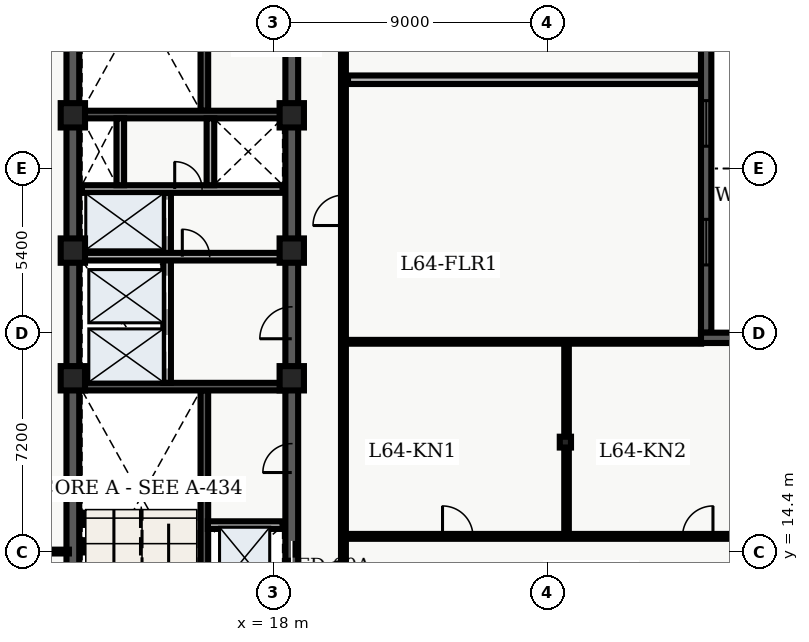
"""IFC4 building model, lengths in metres.
Left out: names, types, materials, properties, quantities, classifications, styles, units other than length and angle.
Written with IfcOpenShell. Run it as: python <this file> out.ifc"""

import sys

from ifc_helpers import new_model, entity, si_unit, converted_unit, direction, frame, origin_with_axes, origin_2d_with_axis, place, context, subcontext, project, spatial, polyline, rectangle, i_section, outline, extrude, element, fill, save


model = new_model("IFC4")
c1 = context("Model", 3, precision=1e-05, world=origin_with_axes(), true_north=direction((0.0, 1.0)))
c2 = subcontext(c1, "Body", "Model", "MODEL_VIEW")
j1 = project(units=[si_unit("LENGTHUNIT", "METRE"), converted_unit("PLANEANGLEUNIT", "DEGREE", entity("IfcPlaneAngleMeasure", 0.017), si_unit("PLANEANGLEUNIT", "RADIAN"), dimensions=[0, 0, 0, 0, 0, 0, 0])], contexts=[c1])
p1 = place(None, origin_with_axes())
s1 = spatial("IfcSite", under=j1, at=p1, CompositionType="ELEMENT")
p2 = place(p1, origin_with_axes())
s2 = spatial("IfcBuilding", under=s1, at=p2, CompositionType="ELEMENT")
p3 = place(p2, frame((0.0, 0.0, 260.7), z_axis=(0.0, 0.0, 1.0), x_axis=(1.0, 0.0, 0.0)))
s3 = spatial("IfcBuildingStorey", under=s2, at=p3, CompositionType="ELEMENT", Elevation=260.7)
p4 = place(p3, frame((11.4, 10.8, 0.0), z_axis=(0.0, 0.0, 1.0), x_axis=(0.0, 1.0, 0.0)))
e1 = element("IfcWall", 1, at=p4, inside=s3, PredefinedType="SHEAR", context=c2, shape_type="SweptSolid", body=[
    extrude(outline(polyline([(0.0, -0.21), (27.0, -0.21), (27.0, 0.21), (0.0, 0.21), (0.0, -0.21)])), origin_with_axes(), (0.0, 0.0, 1.0), 3.66),
])
p5 = place(p3, frame((18.6, 10.8, 0.0), z_axis=(0.0, 0.0, 1.0), x_axis=(0.0, 1.0, 0.0)))
e2 = element("IfcWall", 2, at=p5, inside=s3, PredefinedType="SHEAR", context=c2, shape_type="SweptSolid", body=[
    extrude(outline(polyline([(0.0, -0.21), (13.5, -0.21), (13.5, 0.21), (0.0, 0.21), (0.0, -0.21)])), origin_with_axes(), (0.0, 0.0, 1.0), 3.66),
])
p6 = place(p5, frame((1.3, 0.0, 0.0), z_axis=(0.0, 0.0, 1.0), x_axis=(1.0, 0.0, 0.0)))
e3 = element("IfcOpeningElement", 3, at=p6, cuts=e2, PredefinedType="OPENING", context=c2, shape_type="SweptSolid", body=[
    extrude(rectangle(XDim=1.1, YDim=0.44, at=origin_2d_with_axis()), origin_with_axes(), (0.0, 0.0, 1.0), 2.15),
])
p7 = place(p5, frame((3.4, 0.0, 0.0), z_axis=(0.0, 0.0, 1.0), x_axis=(1.0, 0.0, 0.0)))
e4 = element("IfcOpeningElement", 4, at=p7, cuts=e2, PredefinedType="OPENING", context=c2, shape_type="SweptSolid", body=[
    extrude(rectangle(XDim=1.1, YDim=0.44, at=origin_2d_with_axis()), origin_with_axes(), (0.0, 0.0, 1.0), 2.15),
])
p8 = place(p5, frame((11.125, 0.0, 0.0), z_axis=(0.0, 0.0, 1.0), x_axis=(1.0, 0.0, 0.0)))
e5 = element("IfcOpeningElement", 5, at=p8, cuts=e2, PredefinedType="OPENING", context=c2, shape_type="SweptSolid", body=[
    extrude(rectangle(XDim=1.05, YDim=0.44, at=origin_2d_with_axis()), origin_with_axes(), (0.0, 0.0, 1.0), 2.15),
])
p9 = place(p5, frame((6.675, 0.0, 0.0), z_axis=(0.0, 0.0, 1.0), x_axis=(1.0, 0.0, 0.0)))
e6 = element("IfcOpeningElement", 6, at=p9, cuts=e2, PredefinedType="OPENING", context=c2, shape_type="SweptSolid", body=[
    extrude(rectangle(XDim=0.95, YDim=0.44, at=origin_2d_with_axis()), origin_with_axes(), (0.0, 0.0, 1.0), 2.15),
])
p10 = place(p3, frame((18.6, 24.3, 0.0), z_axis=(0.0, 0.0, 1.0), x_axis=(0.0, 1.0, 0.0)))
e7 = element("IfcWall", 7, at=p10, inside=s3, PredefinedType="SHEAR", context=c2, shape_type="SweptSolid", body=[
    extrude(outline(polyline([(0.0, -0.21), (13.5, -0.21), (13.5, 0.21), (0.0, 0.21), (0.0, -0.21)])), origin_with_axes(), (0.0, 0.0, 1.0), 3.66),
])
p11 = place(p10, frame((8.525, 0.0, 0.0), z_axis=(0.0, 0.0, 1.0), x_axis=(1.0, 0.0, 0.0)))
e8 = element("IfcOpeningElement", 8, at=p11, cuts=e7, PredefinedType="OPENING", context=c2, shape_type="SweptSolid", body=[
    extrude(rectangle(XDim=1.05, YDim=0.44, at=origin_2d_with_axis()), origin_with_axes(), (0.0, 0.0, 1.0), 2.15),
])
p12 = place(p3, frame((15.725, 11.01, 0.0), z_axis=(0.0, 0.0, 1.0), x_axis=(0.0, 1.0, 0.0)))
e9 = element("IfcWall", 9, at=p12, inside=s3, PredefinedType="SHEAR", context=c2, shape_type="SweptSolid", body=[
    extrude(outline(polyline([(0.0, -0.125), (8.69, -0.125), (8.69, 0.125), (0.0, 0.125), (0.0, -0.125)])), origin_with_axes(), (0.0, 0.0, 1.0), 3.66),
])
p13 = place(p3, frame((11.61, 19.825, 0.0), z_axis=(0.0, 0.0, 1.0), x_axis=(1.0, 0.0, 0.0)))
e10 = element("IfcWall", 10, at=p13, inside=s3, PredefinedType="SHEAR", context=c2, shape_type="SweptSolid", body=[
    extrude(outline(polyline([(0.0, -0.125), (6.78, -0.125), (6.78, 0.125), (0.0, 0.125), (0.0, -0.125)])), origin_with_axes(), (0.0, 0.0, 1.0), 3.66),
])
p14 = place(p3, frame((15.725, 28.9, 0.0), z_axis=(0.0, 0.0, 1.0), x_axis=(0.0, 1.0, 0.0)))
e11 = element("IfcWall", 11, at=p14, inside=s3, PredefinedType="SHEAR", context=c2, shape_type="SweptSolid", body=[
    extrude(outline(polyline([(0.0, -0.125), (8.69, -0.125), (8.69, 0.125), (0.0, 0.125), (0.0, -0.125)])), origin_with_axes(), (0.0, 0.0, 1.0), 3.66),
])
p15 = place(p3, frame((11.61, 28.775, 0.0), z_axis=(0.0, 0.0, 1.0), x_axis=(1.0, 0.0, 0.0)))
e12 = element("IfcWall", 12, at=p15, inside=s3, PredefinedType="SHEAR", context=c2, shape_type="SweptSolid", body=[
    extrude(outline(polyline([(0.0, -0.125), (6.78, -0.125), (6.78, 0.125), (0.0, 0.125), (0.0, -0.125)])), origin_with_axes(), (0.0, 0.0, 1.0), 3.66),
])
p16 = place(p3, frame((14.5, 19.95, 0.0), z_axis=(0.0, 0.0, 1.0), x_axis=(0.0, 1.0, 0.0)))
e13 = element("IfcWall", 13, at=p16, inside=s3, PredefinedType="SOLIDWALL", context=c2, shape_type="SweptSolid", body=[
    extrude(outline(polyline([(0.0, -0.125), (6.25, -0.125), (6.25, 0.125), (0.0, 0.125), (0.0, -0.125)])), origin_with_axes(), (0.0, 0.0, 1.0), 2.7),
])
p17 = place(p16, frame((1.025, 0.0, 0.0), z_axis=(0.0, 0.0, 1.0), x_axis=(1.0, 0.0, 0.0)))
e14 = element("IfcOpeningElement", 14, at=p17, cuts=e13, PredefinedType="OPENING", context=c2, shape_type="SweptSolid", body=[
    extrude(rectangle(XDim=1.1, YDim=0.27, at=origin_2d_with_axis()), origin_with_axes(), (0.0, 0.0, 1.0), 2.15),
])
p18 = place(p16, frame((2.975, 0.0, 0.0), z_axis=(0.0, 0.0, 1.0), x_axis=(1.0, 0.0, 0.0)))
e15 = element("IfcOpeningElement", 15, at=p18, cuts=e13, PredefinedType="OPENING", context=c2, shape_type="SweptSolid", body=[
    extrude(rectangle(XDim=1.1, YDim=0.27, at=origin_2d_with_axis()), origin_with_axes(), (0.0, 0.0, 1.0), 2.15),
])
p19 = place(p16, frame((5.425, 0.0, 0.0), z_axis=(0.0, 0.0, 1.0), x_axis=(1.0, 0.0, 0.0)))
e16 = element("IfcOpeningElement", 16, at=p19, cuts=e13, PredefinedType="OPENING", context=c2, shape_type="SweptSolid", body=[
    extrude(rectangle(XDim=1.2, YDim=0.27, at=origin_2d_with_axis()), origin_with_axes(), (0.0, 0.0, 1.0), 2.15),
])
p20 = place(p3, frame((11.7, 24.1, 0.0), z_axis=(0.0, 0.0, 1.0), x_axis=(1.0, 0.0, 0.0)))
e17 = element("IfcWall", 17, at=p20, inside=s3, PredefinedType="SOLIDWALL", context=c2, shape_type="SweptSolid", body=[
    extrude(outline(polyline([(0.0, -0.125), (6.6, -0.125), (6.6, 0.125), (0.0, 0.125), (0.0, -0.125)])), origin_with_axes(), (0.0, 0.0, 1.0), 2.7),
])
p21 = place(p20, frame((3.75, 0.0, 0.0), z_axis=(0.0, 0.0, 1.0), x_axis=(1.0, 0.0, 0.0)))
e18 = element("IfcOpeningElement", 18, at=p21, cuts=e17, PredefinedType="OPENING", context=c2, shape_type="SweptSolid", body=[
    extrude(rectangle(XDim=0.9, YDim=0.27, at=origin_2d_with_axis()), origin_with_axes(), (0.0, 0.0, 1.0), 2.15),
])
p22 = place(p3, frame((11.7, 26.325, 0.0), z_axis=(0.0, 0.0, 1.0), x_axis=(1.0, 0.0, 0.0)))
e19 = element("IfcWall", 19, at=p22, inside=s3, PredefinedType="SOLIDWALL", context=c2, shape_type="SweptSolid", body=[
    extrude(outline(polyline([(0.0, -0.125), (6.6, -0.125), (6.6, 0.125), (0.0, 0.125), (0.0, -0.125)])), origin_with_axes(), (0.0, 0.0, 1.0), 2.7),
])
p23 = place(p22, frame((3.5, 0.0, 0.0), z_axis=(0.0, 0.0, 1.0), x_axis=(1.0, 0.0, 0.0)))
e20 = element("IfcOpeningElement", 20, at=p23, cuts=e19, PredefinedType="OPENING", context=c2, shape_type="SweptSolid", body=[
    extrude(rectangle(XDim=0.9, YDim=0.27, at=origin_2d_with_axis()), origin_with_axes(), (0.0, 0.0, 1.0), 2.15),
])
for number, where, z_axis, x_axis in (
    (21, (12.96, 26.45, 0.0), (0.0, 0.0, 1.0), (0.0, 1.0, 0.0)),
    (22, (15.925, 26.45, 0.0), (0.0, 0.0, 1.0), (0.0, 1.0, 0.0)),
):
    element("IfcWall", number, at=place(p3, frame(where, z_axis=z_axis, x_axis=x_axis)), inside=s3, PredefinedType="SOLIDWALL", context=c2, shape_type="SweptSolid", body=[
        extrude(outline(polyline([(0.0, -0.125), (2.2, -0.125), (2.2, 0.125), (0.0, 0.125), (0.0, -0.125)])), origin_with_axes(), (0.0, 0.0, 1.0), 2.7),
    ])
for number, where, z_axis, x_axis in (
    (23, (11.4, 20.1, 0.0), (0.0, 0.0, 1.0), (1.0, 0.0, 0.0)),
    (24, (11.4, 24.3, 0.0), (0.0, 0.0, 1.0), (1.0, 0.0, 0.0)),
    (25, (11.4, 28.75, 0.0), (0.0, 0.0, 1.0), (1.0, 0.0, 0.0)),
    (26, (18.6, 20.1, 0.0), (0.0, 0.0, 1.0), (1.0, 0.0, 0.0)),
    (27, (18.6, 24.3, 0.0), (0.0, 0.0, 1.0), (1.0, 0.0, 0.0)),
    (28, (18.6, 28.75, 0.0), (0.0, 0.0, 1.0), (1.0, 0.0, 0.0)),
):
    element("IfcColumn", number, at=place(p3, frame(where, z_axis=z_axis, x_axis=x_axis)), inside=s3, PredefinedType="COLUMN", context=c2, shape_type="SweptSolid", body=[
        extrude(rectangle(XDim=0.8, YDim=0.8, at=origin_2d_with_axis()), origin_with_axes(), (0.0, 0.0, 1.0), 3.9),
    ])
p24 = place(p3, frame((27.6, 18.0, 0.0), z_axis=(0.0, 0.0, 1.0), x_axis=(1.0, 0.0, 0.0)))
e29 = element("IfcColumn", 29, at=p24, inside=s3, PredefinedType="COLUMN", context=c2, shape_type="SweptSolid", body=[
    extrude(i_section(OverallWidth=0.369, OverallDepth=0.356, WebThickness=0.011, FlangeThickness=0.018, FilletRadius=0.018, at=origin_2d_with_axis()), origin_with_axes(), (0.0, 0.0, 1.0), 3.9),
])
p25 = place(p3, frame((15.84, 15.27, 0.0), z_axis=(0.0, 0.0, 1.0), x_axis=(1.0, 0.0, 0.0)))
e30 = element("IfcWall", 30, at=p25, inside=s3, PredefinedType="SOLIDWALL", context=c2, shape_type="SweptSolid", body=[
    extrude(outline(polyline([(0.0, -0.125), (2.46, -0.125), (2.46, 0.125), (0.0, 0.125), (0.0, -0.125)])), origin_with_axes(), (0.0, 0.0, 1.0), 2.7),
])
p26 = place(p3, frame((20.3, 7.8, 0.0), z_axis=(0.0, 0.0, 1.0), x_axis=(0.0, 1.0, 0.0)))
e31 = element("IfcWall", 31, at=p26, inside=s3, PredefinedType="PARTITIONING", context=c2, shape_type="SweptSolid", body=[
    extrude(outline(polyline([(0.0, -0.08), (32.7, -0.08), (32.7, 0.08), (0.0, 0.08), (0.0, -0.08)])), origin_with_axes(), (0.0, 0.0, 1.0), 2.7),
])
p27 = place(p26, frame((17.825, 0.0, 0.0), z_axis=(0.0, 0.0, 1.0), x_axis=(1.0, 0.0, 0.0)))
e32 = element("IfcOpeningElement", 32, at=p27, cuts=e31, PredefinedType="OPENING", context=c2, shape_type="SweptSolid", body=[
    extrude(rectangle(XDim=1.0, YDim=0.18, at=origin_2d_with_axis()), origin_with_axes(), (0.0, 0.0, 1.0), 2.15),
])
p28 = place(p26, frame((27.345, 0.0, 0.0), z_axis=(0.0, 0.0, 1.0), x_axis=(1.0, 0.0, 0.0)))
e33 = element("IfcOpeningElement", 33, at=p28, cuts=e31, PredefinedType="OPENING", context=c2, shape_type="SweptSolid", body=[
    extrude(rectangle(XDim=1.0, YDim=0.18, at=origin_2d_with_axis()), origin_with_axes(), (0.0, 0.0, 1.0), 2.15),
])
p29 = place(p26, frame((5.775, 0.0, 0.0), z_axis=(0.0, 0.0, 1.0), x_axis=(1.0, 0.0, 0.0)))
e34 = element("IfcOpeningElement", 34, at=p29, cuts=e31, PredefinedType="OPENING", context=c2, shape_type="SweptSolid", body=[
    extrude(rectangle(XDim=1.05, YDim=0.18, at=origin_2d_with_axis()), origin_with_axes(), (0.0, 0.0, 1.0), 2.15),
])
p30 = place(p3, frame((8.135, 14.4, 0.0), z_axis=(0.0, 0.0, 1.0), x_axis=(1.0, 0.0, 0.0)))
e35 = element("IfcWall", 35, at=p30, inside=s3, PredefinedType="PARTITIONING", context=c2, shape_type="SweptSolid", body=[
    extrude(outline(polyline([(0.0, -0.062), (3.135, -0.062), (3.135, 0.062), (0.0, 0.062), (0.0, -0.062)])), origin_with_axes(), (0.0, 0.0, 1.0), 2.7),
])
p31 = place(p30, frame((1.925, 0.0, 0.0), z_axis=(0.0, 0.0, 1.0), x_axis=(1.0, 0.0, 0.0)))
e36 = element("IfcOpeningElement", 36, at=p31, cuts=e35, PredefinedType="OPENING", context=c2, shape_type="SweptSolid", body=[
    extrude(rectangle(XDim=0.9, YDim=0.145, at=origin_2d_with_axis()), origin_with_axes(), (0.0, 0.0, 1.0), 2.15),
])
p32 = place(p3, frame((20.45, 29.92, 0.0), z_axis=(0.0, 0.0, 1.0), x_axis=(1.0, 0.0, 0.0)))
e37 = element("IfcWall", 37, at=p32, inside=s3, PredefinedType="PARTITIONING", context=c2, shape_type="SweptSolid", body=[
    extrude(outline(polyline([(0.0, -0.14), (11.615, -0.14), (11.615, 0.14), (0.0, 0.14), (0.0, -0.14)])), origin_with_axes(), (0.0, 0.0, 1.0), 2.7),
])
p33 = place(p3, frame((20.3, 14.9, 0.0), z_axis=(0.0, 0.0, 1.0), x_axis=(1.0, 0.0, 0.0)))
e38 = element("IfcWall", 38, at=p33, inside=s3, PredefinedType="PARTITIONING", context=c2, shape_type="SweptSolid", body=[
    extrude(outline(polyline([(0.0, -0.08), (16.05, -0.08), (16.05, 0.08), (0.0, 0.08), (0.0, -0.08)])), origin_with_axes(), (0.0, 0.0, 1.0), 2.7),
])
p34 = place(p33, frame((3.759, 0.0, 0.0), z_axis=(0.0, 0.0, 1.0), x_axis=(1.0, 0.0, 0.0)))
e39 = element("IfcOpeningElement", 39, at=p34, cuts=e38, PredefinedType="OPENING", context=c2, shape_type="SweptSolid", body=[
    extrude(rectangle(XDim=1.0, YDim=0.18, at=origin_2d_with_axis()), origin_with_axes(), (0.0, 0.0, 1.0), 2.15),
])
p35 = place(p33, frame((11.654, 0.0, 0.0), z_axis=(0.0, 0.0, 1.0), x_axis=(1.0, 0.0, 0.0)))
e40 = element("IfcOpeningElement", 40, at=p35, cuts=e38, PredefinedType="OPENING", context=c2, shape_type="SweptSolid", body=[
    extrude(rectangle(XDim=1.0, YDim=0.18, at=origin_2d_with_axis()), origin_with_axes(), (0.0, 0.0, 1.0), 2.15),
])
p36 = place(p3, frame((27.638, 15.02, 0.0), z_axis=(0.0, 0.0, 1.0), x_axis=(0.0, 1.0, 0.0)))
e41 = element("IfcWall", 41, at=p36, inside=s3, PredefinedType="PARTITIONING", context=c2, shape_type="SweptSolid", body=[
    extrude(outline(polyline([(0.0, -0.075), (6.2, -0.075), (6.2, 0.075), (0.0, 0.075), (0.0, -0.075)])), origin_with_axes(), (0.0, 0.0, 1.0), 2.7),
])
p37 = place(p3, frame((20.3, 21.3, 0.0), z_axis=(0.0, 0.0, 1.0), x_axis=(1.0, 0.0, 0.0)))
e42 = element("IfcWall", 42, at=p37, inside=s3, PredefinedType="PARTITIONING", context=c2, shape_type="SweptSolid", body=[
    extrude(outline(polyline([(0.0, -0.062), (11.765, -0.062), (11.765, 0.062), (0.0, 0.062), (0.0, -0.062)])), origin_with_axes(), (0.0, 0.0, 1.0), 2.7),
])
p38 = place(p3, frame((32.23, 41.82, 0.0), z_axis=(0.0, 0.0, 1.0), x_axis=(0.0, -1.0, 0.0)))
e43 = element("IfcWall", 43, at=p38, inside=s3, PredefinedType="SOLIDWALL", context=c2, shape_type="SweptSolid", body=[
    extrude(outline(polyline([(0.0, -0.17), (20.22, -0.17), (20.22, 0.17), (0.0, 0.17), (0.0, -0.17)])), origin_with_axes(), (0.0, 0.0, 1.0), 3.66),
])
p39 = place(p38, frame((2.978, 0.0, 0.45), z_axis=(0.0, 0.0, 1.0), x_axis=(1.0, 0.0, 0.0)))
e44 = element("IfcOpeningElement", 44, at=p39, cuts=e43, PredefinedType="OPENING", context=c2, shape_type="SweptSolid", body=[
    extrude(rectangle(XDim=1.5, YDim=0.36, at=origin_2d_with_axis()), origin_with_axes(), (0.0, 0.0, 1.0), 2.1),
])
p40 = place(p38, frame((7.732, 0.0, 0.45), z_axis=(0.0, 0.0, 1.0), x_axis=(1.0, 0.0, 0.0)))
e45 = element("IfcOpeningElement", 45, at=p40, cuts=e43, PredefinedType="OPENING", context=c2, shape_type="SweptSolid", body=[
    extrude(rectangle(XDim=1.5, YDim=0.36, at=origin_2d_with_axis()), origin_with_axes(), (0.0, 0.0, 1.0), 2.1),
])
p41 = place(p38, frame((13.337, 0.0, 0.45), z_axis=(0.0, 0.0, 1.0), x_axis=(1.0, 0.0, 0.0)))
e46 = element("IfcOpeningElement", 46, at=p41, cuts=e43, PredefinedType="OPENING", context=c2, shape_type="SweptSolid", body=[
    extrude(rectangle(XDim=1.5, YDim=0.36, at=origin_2d_with_axis()), origin_with_axes(), (0.0, 0.0, 1.0), 2.1),
])
p42 = place(p38, frame((17.242, 0.0, 0.45), z_axis=(0.0, 0.0, 1.0), x_axis=(1.0, 0.0, 0.0)))
e47 = element("IfcOpeningElement", 47, at=p42, cuts=e43, PredefinedType="OPENING", context=c2, shape_type="SweptSolid", body=[
    extrude(rectangle(XDim=1.5, YDim=0.36, at=origin_2d_with_axis()), origin_with_axes(), (0.0, 0.0, 1.0), 2.1),
])
p43 = place(p3, frame((32.06, 21.43, 0.0), z_axis=(0.0, 0.0, 1.0), x_axis=(1.0, 0.0, 0.0)))
e48 = element("IfcWall", 48, at=p43, inside=s3, PredefinedType="SOLIDWALL", context=c2, shape_type="SweptSolid", body=[
    extrude(outline(polyline([(0.0, -0.17), (2.14, -0.17), (2.14, 0.17), (0.0, 0.17), (0.0, -0.17)])), origin_with_axes(), (0.0, 0.0, 1.0), 3.66),
])
p44 = place(p5, frame((3.4, 0.0, 0.0), z_axis=(0.0, 0.0, 1.0), x_axis=(1.0, 0.0, 0.0)))
e49 = element("IfcDoor", 49, at=p44, inside=s3, OperationType="SLIDING_TO_RIGHT", PredefinedType="DOOR", context=c2, shape_type="SweptSolid", body=[
    extrude(rectangle(XDim=1.1, YDim=0.09, at=origin_2d_with_axis()), origin_with_axes(), (0.0, 0.0, 1.0), 2.15),
])
fill(e4, e49)
p45 = place(p16, frame((1.025, 0.0, 0.0), z_axis=(0.0, 0.0, 1.0), x_axis=(1.0, 0.0, 0.0)))
e50 = element("IfcDoor", 50, at=p45, inside=s3, OperationType="SLIDING_TO_LEFT", PredefinedType="DOOR", context=c2, shape_type="SweptSolid", body=[
    extrude(rectangle(XDim=1.1, YDim=0.09, at=origin_2d_with_axis()), origin_with_axes(), (0.0, 0.0, 1.0), 2.15),
])
fill(e14, e50)
p46 = place(p16, frame((2.975, 0.0, 0.0), z_axis=(0.0, 0.0, 1.0), x_axis=(1.0, 0.0, 0.0)))
e51 = element("IfcDoor", 51, at=p46, inside=s3, OperationType="SLIDING_TO_RIGHT", PredefinedType="DOOR", context=c2, shape_type="SweptSolid", body=[
    extrude(rectangle(XDim=1.1, YDim=0.09, at=origin_2d_with_axis()), origin_with_axes(), (0.0, 0.0, 1.0), 2.15),
])
fill(e15, e51)
p47 = place(p16, frame((5.425, 0.0, 0.0), z_axis=(0.0, 0.0, 1.0), x_axis=(1.0, 0.0, 0.0)))
e52 = element("IfcDoor", 52, at=p47, inside=s3, OperationType="DOUBLE_DOOR_SLIDING", PredefinedType="DOOR", context=c2, shape_type="SweptSolid", body=[
    extrude(rectangle(XDim=1.2, YDim=0.09, at=origin_2d_with_axis()), origin_with_axes(), (0.0, 0.0, 1.0), 2.15),
])
fill(e16, e52)
p48 = place(p5, frame((11.125, 0.0, 0.0), z_axis=(0.0, 0.0, 1.0), x_axis=(1.0, 0.0, 0.0)))
e53 = element("IfcDoor", 53, at=p48, inside=s3, OperationType="SINGLE_SWING_LEFT", PredefinedType="DOOR", context=c2, shape_type="SweptSolid", body=[
    extrude(rectangle(XDim=1.05, YDim=0.09, at=origin_2d_with_axis()), origin_with_axes(), (0.0, 0.0, 1.0), 2.15),
])
fill(e5, e53)
p49 = place(p20, frame((3.75, 0.0, 0.0), z_axis=(0.0, 0.0, 1.0), x_axis=(1.0, 0.0, 0.0)))
e54 = element("IfcDoor", 54, at=p49, inside=s3, OperationType="SINGLE_SWING_LEFT", PredefinedType="DOOR", context=c2, shape_type="SweptSolid", body=[
    extrude(rectangle(XDim=0.9, YDim=0.09, at=origin_2d_with_axis()), origin_with_axes(), (0.0, 0.0, 1.0), 2.15),
])
fill(e18, e54)
p50 = place(p22, frame((3.5, 0.0, 0.0), z_axis=(0.0, 0.0, 1.0), x_axis=(1.0, 0.0, 0.0)))
e55 = element("IfcDoor", 55, at=p50, inside=s3, OperationType="SINGLE_SWING_LEFT", PredefinedType="DOOR", context=c2, shape_type="SweptSolid", body=[
    extrude(rectangle(XDim=0.9, YDim=0.09, at=origin_2d_with_axis()), origin_with_axes(), (0.0, 0.0, 1.0), 2.15),
])
fill(e20, e55)
p51 = place(p5, frame((6.675, 0.0, 0.0), z_axis=(0.0, 0.0, 1.0), x_axis=(1.0, 0.0, 0.0)))
e56 = element("IfcDoor", 56, at=p51, inside=s3, OperationType="SINGLE_SWING_LEFT", PredefinedType="DOOR", context=c2, shape_type="SweptSolid", body=[
    extrude(rectangle(XDim=0.95, YDim=0.09, at=origin_2d_with_axis()), origin_with_axes(), (0.0, 0.0, 1.0), 2.15),
])
fill(e6, e56)
p52 = place(p26, frame((17.825, 0.0, 0.0), z_axis=(0.0, 0.0, 1.0), x_axis=(1.0, 0.0, 0.0)))
e57 = element("IfcDoor", 57, at=p52, inside=s3, OperationType="SINGLE_SWING_LEFT", PredefinedType="DOOR", context=c2, shape_type="SweptSolid", body=[
    extrude(rectangle(XDim=1.0, YDim=0.09, at=origin_2d_with_axis()), origin_with_axes(), (0.0, 0.0, 1.0), 2.15),
])
fill(e32, e57)
p53 = place(p26, frame((5.775, 0.0, 0.0), z_axis=(0.0, 0.0, 1.0), x_axis=(1.0, 0.0, 0.0)))
e58 = element("IfcDoor", 58, at=p53, inside=s3, OperationType="SINGLE_SWING_LEFT", PredefinedType="DOOR", context=c2, shape_type="SweptSolid", body=[
    extrude(rectangle(XDim=1.05, YDim=0.09, at=origin_2d_with_axis()), origin_with_axes(), (0.0, 0.0, 1.0), 2.15),
])
fill(e34, e58)
p54 = place(p33, frame((3.759, 0.0, 0.0), z_axis=(0.0, 0.0, 1.0), x_axis=(1.0, 0.0, 0.0)))
e59 = element("IfcDoor", 59, at=p54, inside=s3, OperationType="SINGLE_SWING_LEFT", PredefinedType="DOOR", context=c2, shape_type="SweptSolid", body=[
    extrude(rectangle(XDim=1.0, YDim=0.09, at=origin_2d_with_axis()), origin_with_axes(), (0.0, 0.0, 1.0), 2.15),
])
fill(e39, e59)
p55 = place(p33, frame((11.654, 0.0, 0.0), z_axis=(0.0, 0.0, 1.0), x_axis=(1.0, 0.0, 0.0)))
e60 = element("IfcDoor", 60, at=p55, inside=s3, OperationType="SINGLE_SWING_RIGHT", PredefinedType="DOOR", context=c2, shape_type="SweptSolid", body=[
    extrude(rectangle(XDim=1.0, YDim=0.09, at=origin_2d_with_axis()), origin_with_axes(), (0.0, 0.0, 1.0), 2.15),
])
fill(e40, e60)
p56 = place(p38, frame((13.337, 0.0, 0.45), z_axis=(0.0, 0.0, 1.0), x_axis=(1.0, 0.0, 0.0)))
e61 = element("IfcWindow", 61, at=p56, inside=s3, PredefinedType="WINDOW", context=c2, shape_type="SweptSolid", body=[
    extrude(rectangle(XDim=1.5, YDim=0.09, at=origin_2d_with_axis()), origin_with_axes(), (0.0, 0.0, 1.0), 2.1),
])
fill(e46, e61)
p57 = place(p38, frame((17.242, 0.0, 0.45), z_axis=(0.0, 0.0, 1.0), x_axis=(1.0, 0.0, 0.0)))
e62 = element("IfcWindow", 62, at=p57, inside=s3, PredefinedType="WINDOW", context=c2, shape_type="SweptSolid", body=[
    extrude(rectangle(XDim=1.5, YDim=0.09, at=origin_2d_with_axis()), origin_with_axes(), (0.0, 0.0, 1.0), 2.1),
])
fill(e47, e62)
save(model, sys.argv[1])
